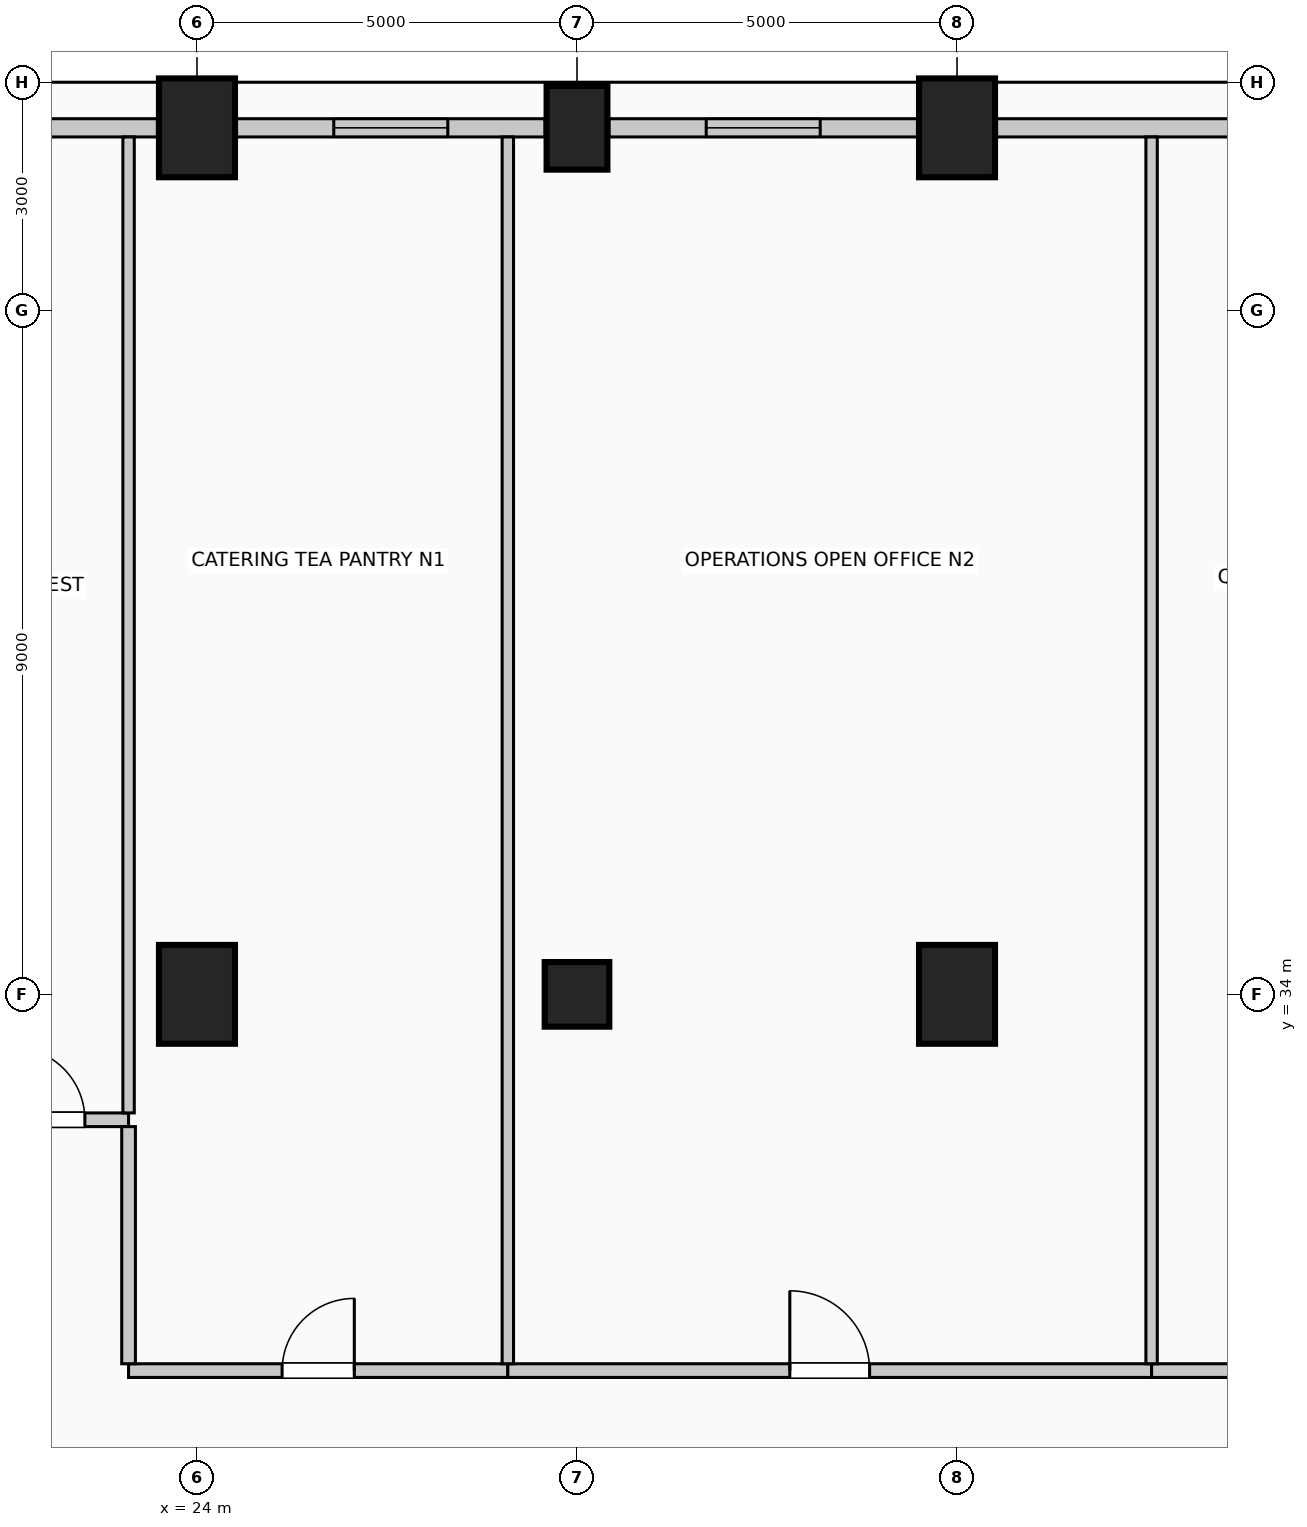
"""IFC4 building model, lengths in metres.
Left out: names, types, materials, properties, quantities, classifications, styles, units other than length and angle.
Written with IfcOpenShell. Run it as: python <this file> out.ifc"""

import sys

from ifc_helpers import new_model, si_unit, direction, frame, frame_2d, origin, origin_2d, place, context, subcontext, project, spatial, rectangle, circle, extrude, element, fill, save


model = new_model("IFC4")
c1 = context("Model", 3, precision=1e-05, world=origin(), true_north=direction((0.0, 1.0)))
c2 = subcontext(c1, "Body", "Model", "MODEL_VIEW")
j1 = project(units=[si_unit("LENGTHUNIT", "METRE"), si_unit("PLANEANGLEUNIT", "RADIAN")], contexts=[c1])
p1 = place(None, origin())
s1 = spatial("IfcSite", under=j1, at=p1, CompositionType="ELEMENT")
p2 = place(p1, origin())
s2 = spatial("IfcBuilding", under=s1, at=p2, CompositionType="ELEMENT")
p3 = place(p2, frame((0.0, 0.0, 218.6)))
s3 = spatial("IfcBuildingStorey", under=s2, at=p3, CompositionType="ELEMENT", Elevation=218.6)
p4 = place(p3, frame((24.0, 45.4, 0.0), z_axis=(0.0, 0.0, 1.0), x_axis=(1.0, 0.0, 0.0)))
e1 = element("IfcColumn", 1, at=p4, inside=s3, PredefinedType="COLUMN", context=c2, shape_type="SweptSolid", body=[
    extrude(rectangle(XDim=1.0, YDim=1.3, at=origin_2d()), origin(), (0.0, 0.0, 1.0), 4.0),
])
p5 = place(p3, frame((29.0, 45.4, 0.0), z_axis=(0.0, 0.0, 1.0), x_axis=(1.0, 0.0, 0.0)))
e2 = element("IfcColumn", 2, at=p5, inside=s3, PredefinedType="COLUMN", context=c2, shape_type="SweptSolid", body=[
    extrude(rectangle(XDim=0.8, YDim=1.1, at=origin_2d()), origin(), (0.0, 0.0, 1.0), 4.0),
])
for number, where, z_axis, x_axis in (
    (3, (34.0, 45.4, 0.0), (0.0, 0.0, 1.0), (1.0, 0.0, 0.0)),
    (4, (24.0, 34.0, 0.0), (0.0, 0.0, 1.0), (1.0, 0.0, 0.0)),
    (5, (34.0, 34.0, 0.0), (0.0, 0.0, 1.0), (1.0, 0.0, 0.0)),
):
    element("IfcColumn", number, at=place(p3, frame(where, z_axis=z_axis, x_axis=x_axis)), inside=s3, PredefinedType="COLUMN", context=c2, shape_type="SweptSolid", body=[
        extrude(rectangle(XDim=1.0, YDim=1.3, at=origin_2d()), origin(), (0.0, 0.0, 1.0), 4.0),
    ])
p6 = place(p3, frame((29.0, 34.0, 0.0), z_axis=(0.0, 0.0, 1.0), x_axis=(1.0, 0.0, 0.0)))
e6 = element("IfcColumn", 6, at=p6, inside=s3, PredefinedType="COLUMN", context=c2, shape_type="SweptSolid", body=[
    extrude(circle(Radius=0.425, at=origin_2d()), origin(), (0.0, 0.0, 1.0), 4.0),
])
p7 = place(p3, frame((16.92, 45.4, 0.0), z_axis=(0.0, 0.0, 1.0), x_axis=(1.0, 0.0, 0.0)))
e7 = element("IfcWall", 7, at=p7, inside=s3, PredefinedType="SOLIDWALL", context=c2, shape_type="SweptSolid", body=[
    extrude(rectangle(XDim=6.56, YDim=0.24, at=frame_2d((3.28, 0.0))), origin(), (0.0, 0.0, 1.0), 3.0),
])
p8 = place(p7, frame((1.187, 0.0, 0.42)))
e8 = element("IfcOpeningElement", 8, at=p8, cuts=e7, PredefinedType="OPENING", context=c2, shape_type="SweptSolid", body=[
    extrude(rectangle(XDim=1.5, YDim=2.2, at=frame_2d((0.75, 1.1))), frame((0.0, 0.13, 0.0), z_axis=(0.0, -1.0, 0.0), x_axis=(1.0, 0.0, 0.0)), (0.0, 0.0, 1.0), 0.26),
])
p9 = place(p3, frame((24.52, 45.4, 0.0), z_axis=(0.0, 0.0, 1.0), x_axis=(1.0, 0.0, 0.0)))
e9 = element("IfcWall", 9, at=p9, inside=s3, PredefinedType="SOLIDWALL", context=c2, shape_type="SweptSolid", body=[
    extrude(rectangle(XDim=4.06, YDim=0.24, at=frame_2d((2.03, 0.0))), origin(), (0.0, 0.0, 1.0), 3.0),
])
p10 = place(p9, frame((1.28, 0.0, 0.42)))
e10 = element("IfcOpeningElement", 10, at=p10, cuts=e9, PredefinedType="OPENING", context=c2, shape_type="SweptSolid", body=[
    extrude(rectangle(XDim=1.5, YDim=2.2, at=frame_2d((0.75, 1.1))), frame((0.0, 0.13, 0.0), z_axis=(0.0, -1.0, 0.0), x_axis=(1.0, 0.0, 0.0)), (0.0, 0.0, 1.0), 0.26),
])
p11 = place(p3, frame((29.42, 45.4, 0.0), z_axis=(0.0, 0.0, 1.0), x_axis=(1.0, 0.0, 0.0)))
e11 = element("IfcWall", 11, at=p11, inside=s3, PredefinedType="SOLIDWALL", context=c2, shape_type="SweptSolid", body=[
    extrude(rectangle(XDim=4.06, YDim=0.24, at=frame_2d((2.03, 0.0))), origin(), (0.0, 0.0, 1.0), 3.0),
])
p12 = place(p11, frame((1.28, 0.0, 0.42)))
e12 = element("IfcOpeningElement", 12, at=p12, cuts=e11, PredefinedType="OPENING", context=c2, shape_type="SweptSolid", body=[
    extrude(rectangle(XDim=1.5, YDim=2.2, at=frame_2d((0.75, 1.1))), frame((0.0, 0.13, 0.0), z_axis=(0.0, -1.0, 0.0), x_axis=(1.0, 0.0, 0.0)), (0.0, 0.0, 1.0), 0.26),
])
p13 = place(p3, frame((34.52, 45.4, 0.0), z_axis=(0.0, 0.0, 1.0), x_axis=(1.0, 0.0, 0.0)))
e13 = element("IfcWall", 13, at=p13, inside=s3, PredefinedType="SOLIDWALL", context=c2, shape_type="SweptSolid", body=[
    extrude(rectangle(XDim=6.56, YDim=0.24, at=frame_2d((3.28, 0.0))), origin(), (0.0, 0.0, 1.0), 3.0),
])
p14 = place(p3, frame((23.1, 29.05, 0.0), z_axis=(0.0, 0.0, 1.0), x_axis=(1.0, 0.0, 0.0)))
e14 = element("IfcWall", 14, at=p14, inside=s3, PredefinedType="PARTITIONING", context=c2, shape_type="SweptSolid", body=[
    extrude(rectangle(XDim=4.99, YDim=0.18, at=frame_2d((2.495, 0.0))), origin(), (0.0, 0.0, 1.0), 3.75),
])
p15 = place(p14, frame((2.02, 0.0, 0.0)))
e15 = element("IfcOpeningElement", 15, at=p15, cuts=e14, PredefinedType="OPENING", context=c2, shape_type="SweptSolid", body=[
    extrude(rectangle(XDim=0.95, YDim=2.15, at=frame_2d((0.475, 1.075))), frame((0.0, 0.1, 0.0), z_axis=(0.0, -1.0, 0.0), x_axis=(1.0, 0.0, 0.0)), (0.0, 0.0, 1.0), 0.2),
])
p16 = place(p3, frame((28.09, 29.05, 0.0), z_axis=(0.0, 0.0, 1.0), x_axis=(1.0, 0.0, 0.0)))
e16 = element("IfcWall", 16, at=p16, inside=s3, PredefinedType="PARTITIONING", context=c2, shape_type="SweptSolid", body=[
    extrude(rectangle(XDim=8.47, YDim=0.18, at=frame_2d((4.235, 0.0))), origin(), (0.0, 0.0, 1.0), 3.75),
])
p17 = place(p16, frame((3.71, 0.0, 0.0)))
e17 = element("IfcOpeningElement", 17, at=p17, cuts=e16, PredefinedType="OPENING", context=c2, shape_type="SweptSolid", body=[
    extrude(rectangle(XDim=1.05, YDim=2.15, at=frame_2d((0.525, 1.075))), frame((0.0, 0.1, 0.0), z_axis=(0.0, -1.0, 0.0), x_axis=(1.0, 0.0, 0.0)), (0.0, 0.0, 1.0), 0.2),
])
p18 = place(p3, frame((36.56, 29.05, 0.0), z_axis=(0.0, 0.0, 1.0), x_axis=(1.0, 0.0, 0.0)))
e18 = element("IfcWall", 18, at=p18, inside=s3, PredefinedType="PARTITIONING", context=c2, shape_type="SweptSolid", body=[
    extrude(rectangle(XDim=4.99, YDim=0.18, at=frame_2d((2.495, 0.0))), origin(), (0.0, 0.0, 1.0), 3.75),
])
p19 = place(p18, frame((2.02, 0.0, 0.0)))
e19 = element("IfcOpeningElement", 19, at=p19, cuts=e18, PredefinedType="OPENING", context=c2, shape_type="SweptSolid", body=[
    extrude(rectangle(XDim=0.95, YDim=2.15, at=frame_2d((0.475, 1.075))), frame((0.0, 0.1, 0.0), z_axis=(0.0, -1.0, 0.0), x_axis=(1.0, 0.0, 0.0)), (0.0, 0.0, 1.0), 0.2),
])
p20 = place(p3, frame((21.0, 32.35, 0.0), z_axis=(0.0, 0.0, 1.0), x_axis=(1.0, 0.0, 0.0)))
e20 = element("IfcWall", 20, at=p20, inside=s3, PredefinedType="PARTITIONING", context=c2, shape_type="SweptSolid", body=[
    extrude(rectangle(XDim=2.1, YDim=0.18, at=frame_2d((1.05, 0.0))), origin(), (0.0, 0.0, 1.0), 3.75),
])
p21 = place(p20, frame((0.575, 0.0, 0.0)))
e21 = element("IfcOpeningElement", 21, at=p21, cuts=e20, PredefinedType="OPENING", context=c2, shape_type="SweptSolid", body=[
    extrude(rectangle(XDim=0.95, YDim=2.15, at=frame_2d((0.475, 1.075))), frame((0.0, 0.1, 0.0), z_axis=(0.0, -1.0, 0.0), x_axis=(1.0, 0.0, 0.0)), (0.0, 0.0, 1.0), 0.2),
])
p22 = place(p3, frame((23.1, 29.14, 0.0), z_axis=(0.0, 0.0, 1.0), x_axis=(0.0, 1.0, 0.0)))
e22 = element("IfcWall", 22, at=p22, inside=s3, PredefinedType="PARTITIONING", context=c2, shape_type="SweptSolid", body=[
    extrude(rectangle(XDim=3.12, YDim=0.18, at=frame_2d((1.56, 0.0))), origin(), (0.0, 0.0, 1.0), 3.75),
])
p23 = place(p3, frame((23.1, 32.44, 0.0), z_axis=(0.0, 0.0, 1.0), x_axis=(0.0, 1.0, 0.0)))
e23 = element("IfcWall", 23, at=p23, inside=s3, PredefinedType="PARTITIONING", context=c2, shape_type="SweptSolid", body=[
    extrude(rectangle(XDim=12.84, YDim=0.15, at=frame_2d((6.42, 0.0))), origin(), (0.0, 0.0, 1.0), 3.75),
])
for number, where, z_axis, x_axis in (
    (24, (28.09, 29.14, 0.0), (0.0, 0.0, 1.0), (0.0, 1.0, 0.0)),
    (25, (36.56, 29.14, 0.0), (0.0, 0.0, 1.0), (0.0, 1.0, 0.0)),
):
    element("IfcWall", number, at=place(p3, frame(where, z_axis=z_axis, x_axis=x_axis)), inside=s3, PredefinedType="PARTITIONING", context=c2, shape_type="SweptSolid", body=[
        extrude(rectangle(XDim=16.14, YDim=0.15, at=frame_2d((8.07, 0.0))), origin(), (0.0, 0.0, 1.0), 3.75),
    ])
p24 = place(p10, origin())
e26 = element("IfcWindow", 26, at=p24, inside=s3, PartitioningType="SINGLE_PANEL", PredefinedType="WINDOW", context=c2, shape_type="SweptSolid", body=[
    extrude(rectangle(XDim=1.5, YDim=2.2, at=frame_2d((0.75, 1.1))), frame((0.0, 0.03, 0.0), z_axis=(0.0, -1.0, 0.0), x_axis=(1.0, 0.0, 0.0)), (0.0, 0.0, 1.0), 0.06),
])
fill(e10, e26)
p25 = place(p12, origin())
e27 = element("IfcWindow", 27, at=p25, inside=s3, PartitioningType="SINGLE_PANEL", PredefinedType="WINDOW", context=c2, shape_type="SweptSolid", body=[
    extrude(rectangle(XDim=1.5, YDim=2.2, at=frame_2d((0.75, 1.1))), frame((0.0, 0.03, 0.0), z_axis=(0.0, -1.0, 0.0), x_axis=(1.0, 0.0, 0.0)), (0.0, 0.0, 1.0), 0.06),
])
fill(e12, e27)
p26 = place(p15, origin())
e28 = element("IfcDoor", 28, at=p26, inside=s3, OperationType="SINGLE_SWING_RIGHT", PredefinedType="DOOR", context=c2, shape_type="SweptSolid", body=[
    extrude(rectangle(XDim=0.95, YDim=2.15, at=frame_2d((0.475, 1.075))), frame((0.0, 0.025, 0.0), z_axis=(0.0, -1.0, 0.0), x_axis=(1.0, 0.0, 0.0)), (0.0, 0.0, 1.0), 0.05),
])
fill(e15, e28)
p27 = place(p17, origin())
e29 = element("IfcDoor", 29, at=p27, inside=s3, OperationType="SINGLE_SWING_LEFT", PredefinedType="DOOR", context=c2, shape_type="SweptSolid", body=[
    extrude(rectangle(XDim=1.05, YDim=2.15, at=frame_2d((0.525, 1.075))), frame((0.0, 0.025, 0.0), z_axis=(0.0, -1.0, 0.0), x_axis=(1.0, 0.0, 0.0)), (0.0, 0.0, 1.0), 0.05),
])
fill(e17, e29)
p28 = place(p21, origin())
e30 = element("IfcDoor", 30, at=p28, inside=s3, OperationType="SINGLE_SWING_LEFT", PredefinedType="DOOR", context=c2, shape_type="SweptSolid", body=[
    extrude(rectangle(XDim=0.95, YDim=2.15, at=frame_2d((0.475, 1.075))), frame((0.0, 0.025, 0.0), z_axis=(0.0, -1.0, 0.0), x_axis=(1.0, 0.0, 0.0)), (0.0, 0.0, 1.0), 0.05),
])
fill(e21, e30)
save(model, sys.argv[1])
